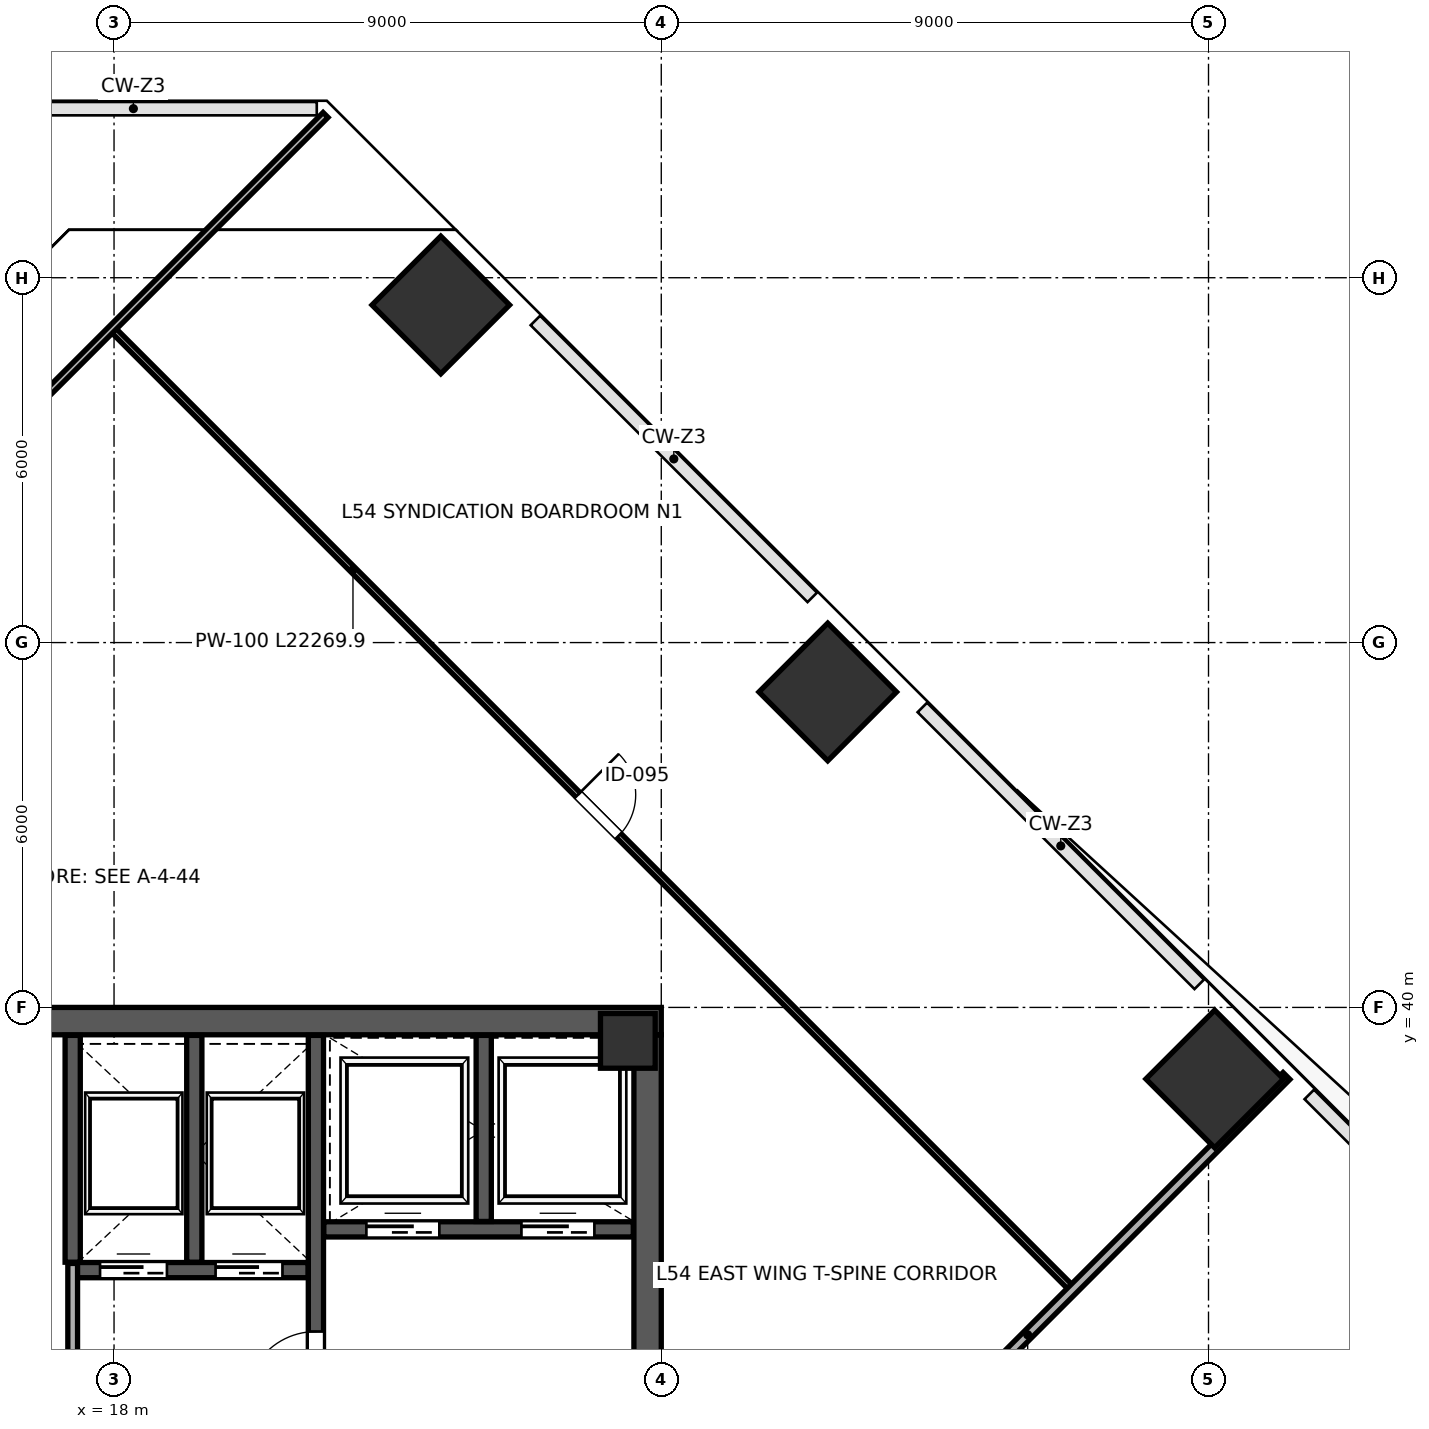
"""IFC4 building model, lengths in metres.
Left out: names, types, materials, properties, quantities, classifications, styles, units other than length and angle.
Written with IfcOpenShell. Run it as: python <this file> out.ifc"""

import sys

from ifc_helpers import new_model, si_unit, direction, frame, frame_2d, origin, origin_2d, place, context, subcontext, project, spatial, rectangle, extrude, source, transform, mapped, element, fill, save


model = new_model("IFC4")
c1 = context("Model", 3, precision=1e-05, world=origin(), true_north=direction((0.0, 1.0)))
c2 = subcontext(c1, "Body", "Model", "MODEL_VIEW")
j1 = project(units=[si_unit("LENGTHUNIT", "METRE"), si_unit("PLANEANGLEUNIT", "RADIAN")], contexts=[c1])
p1 = place(None, origin())
s1 = spatial("IfcSite", under=j1, at=p1, CompositionType="ELEMENT")
p2 = place(p1, origin())
s2 = spatial("IfcBuilding", under=s1, at=p2, CompositionType="ELEMENT")
p3 = place(p2, frame((0.0, 0.0, 241.6)))
s3 = spatial("IfcBuildingStorey", under=s2, at=p3, CompositionType="ELEMENT", Elevation=241.6)
m1 = source(origin(), c2, "Body", "SweptSolid", [
    extrude(rectangle(XDim=0.9, YDim=0.9, at=origin_2d()), origin(), (0.0, 0.0, 1.0), 4.198),
])
p4 = place(p3, frame((26.45, 39.45, 0.001), z_axis=(0.0, 0.0, 1.0), x_axis=(1.0, 0.0, 0.0)))
e1 = element("IfcColumn", 1, at=p4, inside=s3, PredefinedType="COLUMN", context=c2, shape_type="MappedRepresentation", body=[
    mapped(m1, transform((0.0, 0.0, 0.0), scale=1.0)),
])
m2 = source(origin(), c2, "Body", "SweptSolid", [
    extrude(rectangle(XDim=1.6, YDim=1.6, at=origin_2d()), origin(), (0.0, 0.0, 1.0), 4.198),
])
for number, where, z_axis, x_axis in (
    (2, (23.374, 51.552, 0.001), (0.0, 0.0, 1.0), (-0.707, 0.707, 0.0)),
    (3, (29.738, 45.188, 0.001), (0.0, 0.0, 1.0), (-0.707, 0.707, 0.0)),
    (4, (36.102, 38.823, 0.001), (0.0, 0.0, 1.0), (-0.707, 0.707, 0.0)),
):
    element("IfcColumn", number, at=place(p3, frame(where, z_axis=z_axis, x_axis=x_axis)), inside=s3, PredefinedType="COLUMN", context=c2, shape_type="MappedRepresentation", body=[
        mapped(m2, transform((0.0, 0.0, 0.0), scale=1.0)),
    ])
p5 = place(p3, frame((26.775, 24.45, 0.0), z_axis=(0.0, 0.0, 1.0), x_axis=(0.0, 1.0, 0.0)))
e5 = element("IfcWall", 5, at=p5, inside=s3, PredefinedType="SHEAR", context=c2, shape_type="SweptSolid", body=[
    extrude(rectangle(XDim=15.1, YDim=0.45, at=frame_2d((7.55, 0.0))), origin(), (0.0, 0.0, 1.0), 3.96),
])
p6 = place(p5, frame((8.6, 0.0, 0.0)))
e6 = element("IfcOpeningElement", 6, at=p6, cuts=e5, PredefinedType="OPENING", context=c2, shape_type="SweptSolid", body=[
    extrude(rectangle(XDim=1.15, YDim=2.2, at=frame_2d((0.575, 1.1))), frame((0.0, 0.235, 0.0), z_axis=(0.0, -1.0, 0.0), x_axis=(1.0, 0.0, 0.0)), (0.0, 0.0, 1.0), 0.47),
])
p7 = place(p3, frame((9.0, 39.775, 0.0), z_axis=(0.0, 0.0, 1.0), x_axis=(1.0, 0.0, 0.0)))
e7 = element("IfcWall", 7, at=p7, inside=s3, PredefinedType="SHEAR", context=c2, shape_type="SweptSolid", body=[
    extrude(rectangle(XDim=18.0, YDim=0.45, at=frame_2d((9.0, 0.0))), origin(), (0.0, 0.0, 1.0), 3.96),
])
p8 = place(p3, frame((21.32, 32.12, 0.0), z_axis=(0.0, 0.0, 1.0), x_axis=(0.0, 1.0, 0.0)))
e8 = element("IfcWall", 8, at=p8, inside=s3, PredefinedType="SHEAR", context=c2, shape_type="SweptSolid", body=[
    extrude(rectangle(XDim=7.42, YDim=0.25, at=frame_2d((3.71, 0.0))), origin(), (0.0, 0.0, 1.0), 3.96),
])
p9 = place(p8, frame((1.4, 0.0, 0.0)))
e9 = element("IfcOpeningElement", 9, at=p9, cuts=e8, PredefinedType="OPENING", context=c2, shape_type="SweptSolid", body=[
    extrude(rectangle(XDim=1.15, YDim=2.2, at=frame_2d((0.575, 1.1))), frame((0.0, 0.135, 0.0), z_axis=(0.0, -1.0, 0.0), x_axis=(1.0, 0.0, 0.0)), (0.0, 0.0, 1.0), 0.27),
])
p10 = place(p3, frame((21.45, 36.35, 0.0), z_axis=(0.0, 0.0, 1.0), x_axis=(1.0, 0.0, 0.0)))
e10 = element("IfcWall", 10, at=p10, inside=s3, PredefinedType="SHEAR", context=c2, shape_type="SweptSolid", body=[
    extrude(rectangle(XDim=5.09, YDim=0.25, at=frame_2d((2.545, 0.0))), origin(), (0.0, 0.0, 1.0), 3.96),
])
p11 = place(p10, frame((0.7, 0.0, 0.0)))
e11 = element("IfcOpeningElement", 11, at=p11, cuts=e10, PredefinedType="OPENING", context=c2, shape_type="SweptSolid", body=[
    extrude(rectangle(XDim=1.2, YDim=2.2, at=frame_2d((0.6, 1.1))), frame((0.0, 0.135, 0.0), z_axis=(0.0, -1.0, 0.0), x_axis=(1.0, 0.0, 0.0)), (0.0, 0.0, 1.0), 0.27),
])
p12 = place(p10, frame((3.25, 0.0, 0.0)))
e12 = element("IfcOpeningElement", 12, at=p12, cuts=e10, PredefinedType="OPENING", context=c2, shape_type="SweptSolid", body=[
    extrude(rectangle(XDim=1.2, YDim=2.2, at=frame_2d((0.6, 1.1))), frame((0.0, 0.135, 0.0), z_axis=(0.0, -1.0, 0.0), x_axis=(1.0, 0.0, 0.0)), (0.0, 0.0, 1.0), 0.27),
])
p13 = place(p3, frame((24.08, 36.48, 0.0), z_axis=(0.0, 0.0, 1.0), x_axis=(0.0, 1.0, 0.0)))
e13 = element("IfcWall", 13, at=p13, inside=s3, PredefinedType="SHEAR", context=c2, shape_type="SweptSolid", body=[
    extrude(rectangle(XDim=3.06, YDim=0.25, at=frame_2d((1.53, 0.0))), origin(), (0.0, 0.0, 1.0), 3.96),
])
p14 = place(p3, frame((17.32, 35.68, 0.0), z_axis=(0.0, 0.0, 1.0), x_axis=(1.0, 0.0, 0.0)))
e14 = element("IfcWall", 14, at=p14, inside=s3, PredefinedType="SHEAR", context=c2, shape_type="SweptSolid", body=[
    extrude(rectangle(XDim=3.87, YDim=0.25, at=frame_2d((1.935, 0.0))), origin(), (0.0, 0.0, 1.0), 3.96),
])
p15 = place(p14, frame((0.45, 0.0, 0.0)))
e15 = element("IfcOpeningElement", 15, at=p15, cuts=e14, PredefinedType="OPENING", context=c2, shape_type="SweptSolid", body=[
    extrude(rectangle(XDim=1.1, YDim=2.2, at=frame_2d((0.55, 1.1))), frame((0.0, 0.135, 0.0), z_axis=(0.0, -1.0, 0.0), x_axis=(1.0, 0.0, 0.0)), (0.0, 0.0, 1.0), 0.27),
])
p16 = place(p14, frame((2.35, 0.0, 0.0)))
e16 = element("IfcOpeningElement", 16, at=p16, cuts=e14, PredefinedType="OPENING", context=c2, shape_type="SweptSolid", body=[
    extrude(rectangle(XDim=1.1, YDim=2.2, at=frame_2d((0.55, 1.1))), frame((0.0, 0.135, 0.0), z_axis=(0.0, -1.0, 0.0), x_axis=(1.0, 0.0, 0.0)), (0.0, 0.0, 1.0), 0.27),
])
for number, where, z_axis, x_axis in (
    (17, (17.32, 35.81, 0.0), (0.0, 0.0, 1.0), (0.0, 1.0, 0.0)),
    (18, (19.32, 35.81, 0.0), (0.0, 0.0, 1.0), (0.0, 1.0, 0.0)),
):
    element("IfcWall", number, at=place(p3, frame(where, z_axis=z_axis, x_axis=x_axis)), inside=s3, PredefinedType="SHEAR", context=c2, shape_type="SweptSolid", body=[
        extrude(rectangle(XDim=3.73, YDim=0.25, at=frame_2d((1.865, 0.0))), origin(), (0.0, 0.0, 1.0), 3.96),
    ])
p17 = place(p3, frame((17.32, 33.86, 0.0), z_axis=(0.0, 0.0, 1.0), x_axis=(0.0, 1.0, 0.0)))
e19 = element("IfcWall", 19, at=p17, inside=s3, PredefinedType="PARTITIONING", context=c2, shape_type="SweptSolid", body=[
    extrude(rectangle(XDim=1.93, YDim=0.16, at=frame_2d((0.965, 0.0))), origin(), (0.0, 0.0, 1.0), 3.96),
])
p18 = place(p3, frame((17.993, 51.134, 0.0), z_axis=(0.0, 0.0, 1.0), x_axis=(0.707106781187, -0.707106781187, 0.0)))
e20 = element("IfcWall", 20, at=p18, inside=s3, PredefinedType="PARTITIONING", context=c2, shape_type="SweptSolid", body=[
    extrude(rectangle(XDim=22.27, YDim=0.1, at=frame_2d((11.135, 0.0))), origin(), (0.0, 0.0, 1.0), 3.96),
])
p19 = place(p18, frame((10.8, 0.0, 0.0)))
e21 = element("IfcOpeningElement", 21, at=p19, cuts=e20, PredefinedType="OPENING", context=c2, shape_type="SweptSolid", body=[
    extrude(rectangle(XDim=0.95, YDim=2.15, at=frame_2d((0.475, 1.075))), frame((0.0, 0.06, 0.0), z_axis=(0.0, -1.0, 0.0), x_axis=(1.0, 0.0, 0.0)), (0.0, 0.0, 1.0), 0.12),
])
p20 = place(p3, frame((0.775, 33.973, 0.0), z_axis=(0.0, 0.0, 1.0), x_axis=(0.707106781187, 0.707106781187, 0.0)))
e22 = element("IfcWall", 22, at=p20, inside=s3, PredefinedType="PARTITIONING", context=c2, shape_type="SweptSolid", body=[
    extrude(rectangle(XDim=29.28, YDim=0.115, at=frame_2d((14.64, 0.0))), origin(), (0.0, 0.0, 1.0), 3.96),
])
p21 = place(p20, frame((2.2, 0.0, 0.0)))
e23 = element("IfcOpeningElement", 23, at=p21, cuts=e22, PredefinedType="OPENING", context=c2, shape_type="SweptSolid", body=[
    extrude(rectangle(XDim=0.95, YDim=2.15, at=frame_2d((0.475, 1.075))), frame((0.0, 0.067, 0.0), z_axis=(0.0, -1.0, 0.0), x_axis=(1.0, 0.0, 0.0)), (0.0, 0.0, 1.0), 0.135),
])
p22 = place(p3, frame((28.769, 30.36, 0.0), z_axis=(0.0, 0.0, 1.0), x_axis=(0.707116919863, 0.707096642365, 0.0)))
e24 = element("IfcWall", 24, at=p22, inside=s3, PredefinedType="PARTITIONING", context=c2, shape_type="SweptSolid", body=[
    extrude(rectangle(XDim=12.04, YDim=0.16, at=frame_2d((6.02, 0.0))), origin(), (0.0, 0.0, 1.0), 3.195),
])
m3 = source(origin(), c2, "Body", "SweptSolid", [
    extrude(rectangle(XDim=1.15, YDim=2.2, at=frame_2d((0.575, 1.1))), frame((0.0, 0.025, 0.0), z_axis=(0.0, -1.0, 0.0), x_axis=(1.0, 0.0, 0.0)), (0.0, 0.0, 1.0), 0.05),
])
p23 = place(p9, origin())
e25 = element("IfcDoor", 25, at=p23, inside=s3, OperationType="SINGLE_SWING_LEFT", PredefinedType="DOOR", context=c2, shape_type="MappedRepresentation", body=[
    mapped(m3, transform((0.0, 0.0, 0.0), scale=1.0)),
])
fill(e9, e25)
m4 = source(origin(), c2, "Body", "SweptSolid", [
    extrude(rectangle(XDim=1.1, YDim=2.2, at=frame_2d((0.55, 1.1))), frame((0.0, 0.025, 0.0), z_axis=(0.0, -1.0, 0.0), x_axis=(1.0, 0.0, 0.0)), (0.0, 0.0, 1.0), 0.05),
])
p24 = place(p15, origin())
e26 = element("IfcDoor", 26, at=p24, inside=s3, OperationType="SLIDING_TO_LEFT", PredefinedType="DOOR", context=c2, shape_type="MappedRepresentation", body=[
    mapped(m4, transform((0.0, 0.0, 0.0), scale=1.0)),
])
fill(e15, e26)
p25 = place(p16, origin())
e27 = element("IfcDoor", 27, at=p25, inside=s3, OperationType="SLIDING_TO_RIGHT", PredefinedType="DOOR", context=c2, shape_type="MappedRepresentation", body=[
    mapped(m4, transform((0.0, 0.0, 0.0), scale=1.0)),
])
fill(e16, e27)
m5 = source(origin(), c2, "Body", "SweptSolid", [
    extrude(rectangle(XDim=1.2, YDim=2.2, at=frame_2d((0.6, 1.1))), frame((0.0, 0.025, 0.0), z_axis=(0.0, -1.0, 0.0), x_axis=(1.0, 0.0, 0.0)), (0.0, 0.0, 1.0), 0.05),
])
p26 = place(p11, origin())
e28 = element("IfcDoor", 28, at=p26, inside=s3, OperationType="SLIDING_TO_LEFT", PredefinedType="DOOR", context=c2, shape_type="MappedRepresentation", body=[
    mapped(m5, transform((0.0, 0.0, 0.0), scale=1.0)),
])
fill(e11, e28)
p27 = place(p12, origin())
e29 = element("IfcDoor", 29, at=p27, inside=s3, OperationType="SLIDING_TO_RIGHT", PredefinedType="DOOR", context=c2, shape_type="MappedRepresentation", body=[
    mapped(m5, transform((0.0, 0.0, 0.0), scale=1.0)),
])
fill(e12, e29)
m6 = source(origin(), c2, "Body", "SweptSolid", [
    extrude(rectangle(XDim=0.95, YDim=2.15, at=frame_2d((0.475, 1.075))), frame((0.0, 0.025, 0.0), z_axis=(0.0, -1.0, 0.0), x_axis=(1.0, 0.0, 0.0)), (0.0, 0.0, 1.0), 0.05),
])
p28 = place(p19, origin())
e30 = element("IfcDoor", 30, at=p28, inside=s3, OperationType="SINGLE_SWING_LEFT", PredefinedType="DOOR", context=c2, shape_type="MappedRepresentation", body=[
    mapped(m6, transform((0.0, 0.0, 0.0), scale=1.0)),
])
fill(e21, e30)
save(model, sys.argv[1])
